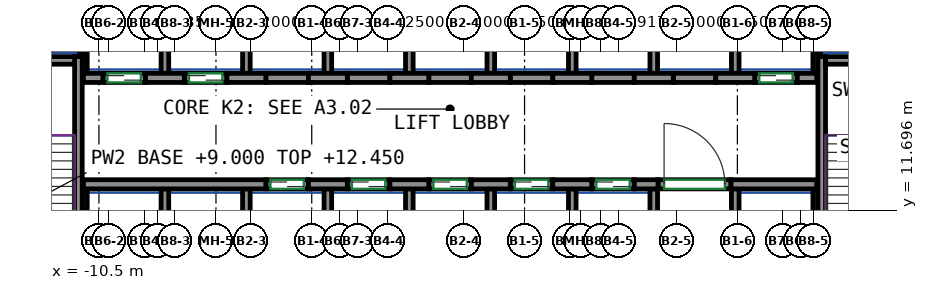
"""IFC4 building model, lengths in metres.
Left out: names, types, materials, properties, quantities, classifications, styles, units other than length and angle.
Written with IfcOpenShell. Run it as: python <this file> out.ifc"""

import sys

from ifc_helpers import new_model, si_unit, direction, frame, frame_2d, origin, place, context, subcontext, project, spatial, rectangle, extrude, source, transform, mapped, element, fill, save


model = new_model("IFC4")
c1 = context("Model", 3, precision=1e-05, world=origin(), true_north=direction((0.0, 1.0)))
c2 = subcontext(c1, "Body", "Model", "MODEL_VIEW")
j1 = project(units=[si_unit("LENGTHUNIT", "METRE"), si_unit("PLANEANGLEUNIT", "RADIAN")], contexts=[c1])
p1 = place(None, origin())
s1 = spatial("IfcSite", under=j1, at=p1, CompositionType="ELEMENT")
p2 = place(p1, origin())
s2 = spatial("IfcBuilding", under=s1, at=p2, CompositionType="ELEMENT")
p3 = place(p2, frame((0.0, 0.0, 9.0)))
s3 = spatial("IfcBuildingStorey", under=s2, at=p3, CompositionType="ELEMENT", Elevation=9.0)
m1 = source(origin(), c2, "Body", "SweptSolid", [
    extrude(rectangle(XDim=7.75, YDim=0.25, at=frame_2d((3.875, 0.0))), origin(), (0.0, 0.0, 1.0), 4.1),
])
p4 = place(p3, frame((-11.175, 9.0, 0.0), z_axis=(0.0, 0.0, 1.0), x_axis=(0.0, 1.0, 0.0)))
e1 = element("IfcWall", 1, at=p4, inside=s3, PredefinedType="SHEAR", context=c2, shape_type="MappedRepresentation", body=[
    mapped(m1, transform((0.0, 0.0, 0.0))),
])
m2 = source(origin(), c2, "Body", "SweptSolid", [
    extrude(rectangle(XDim=3.7, YDim=0.25, at=frame_2d((1.85, 0.0))), origin(), (0.0, 0.0, 1.0), 4.1),
])
p5 = place(p3, frame((-15.0, 16.625, 0.0), z_axis=(0.0, 0.0, 1.0), x_axis=(1.0, 0.0, 0.0)))
e2 = element("IfcWall", 2, at=p5, inside=s3, PredefinedType="SHEAR", context=c2, shape_type="MappedRepresentation", body=[
    mapped(m2, transform((0.0, 0.0, 0.0))),
])
p6 = place(p3, frame((13.275, 9.0, 0.0), z_axis=(0.0, 0.0, 1.0), x_axis=(0.0, 1.0, 0.0)))
e3 = element("IfcWall", 3, at=p6, inside=s3, PredefinedType="SHEAR", context=c2, shape_type="MappedRepresentation", body=[
    mapped(m1, transform((0.0, 0.0, 0.0))),
])
m3 = source(origin(), c2, "Body", "SweptSolid", [
    extrude(rectangle(XDim=3.7, YDim=0.25, at=frame_2d((1.85, 0.0))), origin(), (0.0, 0.0, 1.0), 4.1),
])
p7 = place(p3, frame((13.4, 16.625, 0.0), z_axis=(0.0, 0.0, 1.0), x_axis=(1.0, 0.0, 0.0)))
e4 = element("IfcWall", 4, at=p7, inside=s3, PredefinedType="SHEAR", context=c2, shape_type="MappedRepresentation", body=[
    mapped(m3, transform((0.0, 0.0, 0.0))),
])
m4 = source(origin(), c2, "Body", "SweptSolid", [
    extrude(rectangle(XDim=6.0, YDim=0.3, at=frame_2d((3.0, 0.0))), origin(), (0.0, 0.0, 1.0), 4.1),
])
p8 = place(p3, frame((-11.01, 12.55, 0.0), z_axis=(0.0, 0.0, 1.0), x_axis=(1.0, 0.0, 0.0)))
e5 = element("IfcWall", 5, at=p8, inside=s3, PredefinedType="SHEAR", context=c2, shape_type="MappedRepresentation", body=[
    mapped(m4, transform((0.0, 0.0, 0.0))),
])
m5 = source(origin(), c2, "Body", "SweptSolid", [
    extrude(rectangle(XDim=1.28, YDim=0.3, at=frame_2d((0.64, 0.0))), origin(), (0.0, 0.0, 1.0), 4.1),
])
for number, where, z_axis, x_axis in (
    (6, (-3.61, 12.55, 0.0), (0.0, 0.0, 1.0), (1.0, 0.0, 0.0)),
    (7, (-0.93, 12.55, 0.0), (0.0, 0.0, 1.0), (1.0, 0.0, 0.0)),
    (8, (1.75, 12.55, 0.0), (0.0, 0.0, 1.0), (1.0, 0.0, 0.0)),
    (9, (4.43, 12.55, 0.0), (0.0, 0.0, 1.0), (1.0, 0.0, 0.0)),
):
    element("IfcWall", number, at=place(p3, frame(where, z_axis=z_axis, x_axis=x_axis)), inside=s3, PredefinedType="SHEAR", context=c2, shape_type="MappedRepresentation", body=[
        mapped(m5, transform((0.0, 0.0, 0.0))),
    ])
m6 = source(origin(), c2, "Body", "SweptSolid", [
    extrude(rectangle(XDim=0.78, YDim=0.3, at=frame_2d((0.39, 0.0))), origin(), (0.0, 0.0, 1.0), 4.1),
])
p9 = place(p3, frame((7.11, 12.55, 0.0), z_axis=(0.0, 0.0, 1.0), x_axis=(1.0, 0.0, 0.0)))
e10 = element("IfcWall", 10, at=p9, inside=s3, PredefinedType="SHEAR", context=c2, shape_type="MappedRepresentation", body=[
    mapped(m6, transform((0.0, 0.0, 0.0))),
])
m7 = source(origin(), c2, "Body", "SweptSolid", [
    extrude(rectangle(XDim=2.82, YDim=0.3, at=frame_2d((1.41, 0.0))), origin(), (0.0, 0.0, 1.0), 4.1),
])
p10 = place(p3, frame((10.29, 12.55, 0.0), z_axis=(0.0, 0.0, 1.0), x_axis=(1.0, 0.0, 0.0)))
e11 = element("IfcWall", 11, at=p10, inside=s3, PredefinedType="SHEAR", context=c2, shape_type="MappedRepresentation", body=[
    mapped(m7, transform((0.0, 0.0, 0.0))),
])
m8 = source(origin(), c2, "Body", "SweptSolid", [
    extrude(rectangle(XDim=0.64, YDim=0.3, at=frame_2d((0.32, 0.0))), origin(), (0.0, 0.0, 1.0), 4.1),
])
p11 = place(p3, frame((-11.01, 16.05, 0.0), z_axis=(0.0, 0.0, 1.0), x_axis=(1.0, 0.0, 0.0)))
e12 = element("IfcWall", 12, at=p11, inside=s3, PredefinedType="SHEAR", context=c2, shape_type="MappedRepresentation", body=[
    mapped(m8, transform((0.0, 0.0, 0.0))),
])
for number, where, z_axis, x_axis in (
    (13, (-8.97, 16.05, 0.0), (0.0, 0.0, 1.0), (1.0, 0.0, 0.0)),
    (14, (-6.29, 16.05, 0.0), (0.0, 0.0, 1.0), (1.0, 0.0, 0.0)),
    (15, (-3.61, 16.05, 0.0), (0.0, 0.0, 1.0), (1.0, 0.0, 0.0)),
    (16, (-0.93, 16.05, 0.0), (0.0, 0.0, 1.0), (1.0, 0.0, 0.0)),
    (17, (1.75, 16.05, 0.0), (0.0, 0.0, 1.0), (1.0, 0.0, 0.0)),
    (18, (4.43, 16.05, 0.0), (0.0, 0.0, 1.0), (1.0, 0.0, 0.0)),
):
    element("IfcWall", number, at=place(p3, frame(where, z_axis=z_axis, x_axis=x_axis)), inside=s3, PredefinedType="SHEAR", context=c2, shape_type="MappedRepresentation", body=[
        mapped(m5, transform((0.0, 0.0, 0.0))),
    ])
m9 = source(origin(), c2, "Body", "SweptSolid", [
    extrude(rectangle(XDim=1.28, YDim=0.3, at=frame_2d((0.64, 0.0))), origin(), (0.0, 0.0, 1.0), 4.1),
])
p12 = place(p3, frame((7.11, 16.05, 0.0), z_axis=(0.0, 0.0, 1.0), x_axis=(1.0, 0.0, 0.0)))
e19 = element("IfcWall", 19, at=p12, inside=s3, PredefinedType="SHEAR", context=c2, shape_type="MappedRepresentation", body=[
    mapped(m9, transform((0.0, 0.0, 0.0))),
])
p13 = place(p3, frame((9.79, 16.05, 0.0), z_axis=(0.0, 0.0, 1.0), x_axis=(1.0, 0.0, 0.0)))
e20 = element("IfcWall", 20, at=p13, inside=s3, PredefinedType="SHEAR", context=c2, shape_type="MappedRepresentation", body=[
    mapped(m5, transform((0.0, 0.0, 0.0))),
])
m10 = source(origin(), c2, "Body", "SweptSolid", [
    extrude(rectangle(XDim=0.64, YDim=0.3, at=frame_2d((0.32, 0.0))), origin(), (0.0, 0.0, 1.0), 4.1),
])
p14 = place(p3, frame((12.47, 16.05, 0.0), z_axis=(0.0, 0.0, 1.0), x_axis=(1.0, 0.0, 0.0)))
e21 = element("IfcWall", 21, at=p14, inside=s3, PredefinedType="SHEAR", context=c2, shape_type="MappedRepresentation", body=[
    mapped(m10, transform((0.0, 0.0, 0.0))),
])
m11 = source(origin(), c2, "Body", "SweptSolid", [
    extrude(rectangle(XDim=1.4, YDim=0.3, at=frame_2d((0.7, 0.0))), origin(), (0.0, 0.0, 1.0), 4.1),
])
p15 = place(p3, frame((-5.01, 12.55, 0.0), z_axis=(0.0, 0.0, 1.0), x_axis=(1.0, 0.0, 0.0)))
e22 = element("IfcWall", 22, at=p15, inside=s3, PredefinedType="PARTITIONING", context=c2, shape_type="MappedRepresentation", body=[
    mapped(m11, transform((0.0, 0.0, 0.0))),
])
p16 = place(p15, frame((0.15, 0.0, 0.0)))
e23 = element("IfcOpeningElement", 23, at=p16, cuts=e22, PredefinedType="OPENING", context=c2, shape_type="SweptSolid", body=[
    extrude(rectangle(XDim=1.1, YDim=2.1, at=frame_2d((0.55, 1.05))), frame((0.0, 0.16, 0.0), z_axis=(0.0, -1.0, 0.0), x_axis=(1.0, 0.0, 0.0)), (0.0, 0.0, 1.0), 0.32),
])
m12 = source(origin(), c2, "Body", "SweptSolid", [
    extrude(rectangle(XDim=1.4, YDim=0.3, at=frame_2d((0.7, 0.0))), origin(), (0.0, 0.0, 1.0), 4.1),
])
p17 = place(p3, frame((-2.33, 12.55, 0.0), z_axis=(0.0, 0.0, 1.0), x_axis=(1.0, 0.0, 0.0)))
e24 = element("IfcWall", 24, at=p17, inside=s3, PredefinedType="PARTITIONING", context=c2, shape_type="MappedRepresentation", body=[
    mapped(m12, transform((0.0, 0.0, 0.0))),
])
p18 = place(p17, frame((0.15, 0.0, 0.0)))
e25 = element("IfcOpeningElement", 25, at=p18, cuts=e24, PredefinedType="OPENING", context=c2, shape_type="SweptSolid", body=[
    extrude(rectangle(XDim=1.1, YDim=2.1, at=frame_2d((0.55, 1.05))), frame((0.0, 0.16, 0.0), z_axis=(0.0, -1.0, 0.0), x_axis=(1.0, 0.0, 0.0)), (0.0, 0.0, 1.0), 0.32),
])
p19 = place(p3, frame((0.35, 12.55, 0.0), z_axis=(0.0, 0.0, 1.0), x_axis=(1.0, 0.0, 0.0)))
e26 = element("IfcWall", 26, at=p19, inside=s3, PredefinedType="PARTITIONING", context=c2, shape_type="MappedRepresentation", body=[
    mapped(m11, transform((0.0, 0.0, 0.0))),
])
p20 = place(p19, frame((0.15, 0.0, 0.0)))
e27 = element("IfcOpeningElement", 27, at=p20, cuts=e26, PredefinedType="OPENING", context=c2, shape_type="SweptSolid", body=[
    extrude(rectangle(XDim=1.1, YDim=2.1, at=frame_2d((0.55, 1.05))), frame((0.0, 0.16, 0.0), z_axis=(0.0, -1.0, 0.0), x_axis=(1.0, 0.0, 0.0)), (0.0, 0.0, 1.0), 0.32),
])
p21 = place(p3, frame((3.03, 12.55, 0.0), z_axis=(0.0, 0.0, 1.0), x_axis=(1.0, 0.0, 0.0)))
e28 = element("IfcWall", 28, at=p21, inside=s3, PredefinedType="PARTITIONING", context=c2, shape_type="MappedRepresentation", body=[
    mapped(m11, transform((0.0, 0.0, 0.0))),
])
p22 = place(p21, frame((0.15, 0.0, 0.0)))
e29 = element("IfcOpeningElement", 29, at=p22, cuts=e28, PredefinedType="OPENING", context=c2, shape_type="SweptSolid", body=[
    extrude(rectangle(XDim=1.1, YDim=2.1, at=frame_2d((0.55, 1.05))), frame((0.0, 0.16, 0.0), z_axis=(0.0, -1.0, 0.0), x_axis=(1.0, 0.0, 0.0)), (0.0, 0.0, 1.0), 0.32),
])
p23 = place(p3, frame((5.71, 12.55, 0.0), z_axis=(0.0, 0.0, 1.0), x_axis=(1.0, 0.0, 0.0)))
e30 = element("IfcWall", 30, at=p23, inside=s3, PredefinedType="PARTITIONING", context=c2, shape_type="MappedRepresentation", body=[
    mapped(m12, transform((0.0, 0.0, 0.0))),
])
p24 = place(p23, frame((0.15, 0.0, 0.0)))
e31 = element("IfcOpeningElement", 31, at=p24, cuts=e30, PredefinedType="OPENING", context=c2, shape_type="SweptSolid", body=[
    extrude(rectangle(XDim=1.1, YDim=2.1, at=frame_2d((0.55, 1.05))), frame((0.0, 0.16, 0.0), z_axis=(0.0, -1.0, 0.0), x_axis=(1.0, 0.0, 0.0)), (0.0, 0.0, 1.0), 0.32),
])
p25 = place(p3, frame((11.07, 16.05, 0.0), z_axis=(0.0, 0.0, 1.0), x_axis=(1.0, 0.0, 0.0)))
e32 = element("IfcWall", 32, at=p25, inside=s3, PredefinedType="PARTITIONING", context=c2, shape_type="MappedRepresentation", body=[
    mapped(m11, transform((0.0, 0.0, 0.0))),
])
p26 = place(p25, frame((0.15, 0.0, 0.0)))
e33 = element("IfcOpeningElement", 33, at=p26, cuts=e32, PredefinedType="OPENING", context=c2, shape_type="SweptSolid", body=[
    extrude(rectangle(XDim=1.1, YDim=2.1, at=frame_2d((0.55, 1.05))), frame((0.0, 0.16, 0.0), z_axis=(0.0, -1.0, 0.0), x_axis=(1.0, 0.0, 0.0)), (0.0, 0.0, 1.0), 0.32),
])
p27 = place(p3, frame((-10.37, 16.05, 0.0), z_axis=(0.0, 0.0, 1.0), x_axis=(1.0, 0.0, 0.0)))
e34 = element("IfcWall", 34, at=p27, inside=s3, PredefinedType="PARTITIONING", context=c2, shape_type="MappedRepresentation", body=[
    mapped(m12, transform((0.0, 0.0, 0.0))),
])
p28 = place(p27, frame((0.15, 0.0, 0.0)))
e35 = element("IfcOpeningElement", 35, at=p28, cuts=e34, PredefinedType="OPENING", context=c2, shape_type="SweptSolid", body=[
    extrude(rectangle(XDim=1.1, YDim=2.1, at=frame_2d((0.55, 1.05))), frame((0.0, 0.16, 0.0), z_axis=(0.0, -1.0, 0.0), x_axis=(1.0, 0.0, 0.0)), (0.0, 0.0, 1.0), 0.32),
])
p29 = place(p3, frame((-7.69, 16.05, 0.0), z_axis=(0.0, 0.0, 1.0), x_axis=(1.0, 0.0, 0.0)))
e36 = element("IfcWall", 36, at=p29, inside=s3, PredefinedType="PARTITIONING", context=c2, shape_type="MappedRepresentation", body=[
    mapped(m11, transform((0.0, 0.0, 0.0))),
])
p30 = place(p29, frame((0.15, 0.0, 0.0)))
e37 = element("IfcOpeningElement", 37, at=p30, cuts=e36, PredefinedType="OPENING", context=c2, shape_type="SweptSolid", body=[
    extrude(rectangle(XDim=1.1, YDim=2.1, at=frame_2d((0.55, 1.05))), frame((0.0, 0.16, 0.0), z_axis=(0.0, -1.0, 0.0), x_axis=(1.0, 0.0, 0.0)), (0.0, 0.0, 1.0), 0.32),
])
m13 = source(origin(), c2, "Body", "SweptSolid", [
    extrude(rectangle(XDim=2.4, YDim=0.3, at=frame_2d((1.2, 0.0))), origin(), (0.0, 0.0, 1.0), 4.1),
])
p31 = place(p3, frame((7.89, 12.55, 0.0), z_axis=(0.0, 0.0, 1.0), x_axis=(1.0, 0.0, 0.0)))
e38 = element("IfcWall", 38, at=p31, inside=s3, PredefinedType="PARTITIONING", context=c2, shape_type="MappedRepresentation", body=[
    mapped(m13, transform((0.0, 0.0, 0.0))),
])
p32 = place(p31, frame((0.2, 0.0, 0.0)))
e39 = element("IfcOpeningElement", 39, at=p32, cuts=e38, PredefinedType="OPENING", context=c2, shape_type="SweptSolid", body=[
    extrude(rectangle(XDim=2.0, YDim=2.1, at=frame_2d((1.0, 1.05))), frame((0.0, 0.16, 0.0), z_axis=(0.0, -1.0, 0.0), x_axis=(1.0, 0.0, 0.0)), (0.0, 0.0, 1.0), 0.32),
])
p33 = place(p3, frame((-5.01, 16.05, 0.0), z_axis=(0.0, 0.0, 1.0), x_axis=(1.0, 0.0, 0.0)))
e40 = element("IfcWall", 40, at=p33, inside=s3, PredefinedType="PARTITIONING", context=c2, shape_type="MappedRepresentation", body=[
    mapped(m11, transform((0.0, 0.0, 0.0))),
])
p34 = place(p3, frame((-2.33, 16.05, 0.0), z_axis=(0.0, 0.0, 1.0), x_axis=(1.0, 0.0, 0.0)))
e41 = element("IfcWall", 41, at=p34, inside=s3, PredefinedType="PARTITIONING", context=c2, shape_type="MappedRepresentation", body=[
    mapped(m12, transform((0.0, 0.0, 0.0))),
])
for number, where, z_axis, x_axis in (
    (42, (0.35, 16.05, 0.0), (0.0, 0.0, 1.0), (1.0, 0.0, 0.0)),
    (43, (3.03, 16.05, 0.0), (0.0, 0.0, 1.0), (1.0, 0.0, 0.0)),
):
    element("IfcWall", number, at=place(p3, frame(where, z_axis=z_axis, x_axis=x_axis)), inside=s3, PredefinedType="PARTITIONING", context=c2, shape_type="MappedRepresentation", body=[
        mapped(m11, transform((0.0, 0.0, 0.0))),
    ])
for number, where, z_axis, x_axis in (
    (44, (5.71, 16.05, 0.0), (0.0, 0.0, 1.0), (1.0, 0.0, 0.0)),
    (45, (8.39, 16.05, 0.0), (0.0, 0.0, 1.0), (1.0, 0.0, 0.0)),
):
    element("IfcWall", number, at=place(p3, frame(where, z_axis=z_axis, x_axis=x_axis)), inside=s3, PredefinedType="PARTITIONING", context=c2, shape_type="MappedRepresentation", body=[
        mapped(m12, transform((0.0, 0.0, 0.0))),
    ])
m14 = source(origin(), c2, "Body", "SweptSolid", [
    extrude(rectangle(XDim=3.275, YDim=0.165, at=frame_2d((1.638, 0.0))), origin(), (0.0, 0.0, 1.0), 4.1),
])
for number, where, z_axis, x_axis in (
    (46, (13.067, 16.2, 0.0), (0.0, 0.0, 1.0), (0.0, 1.0, 0.0)),
    (47, (-10.968, 16.2, 0.0), (0.0, 0.0, 1.0), (0.0, 1.0, 0.0)),
):
    element("IfcWall", number, at=place(p3, frame(where, z_axis=z_axis, x_axis=x_axis)), inside=s3, PredefinedType="PARTITIONING", context=c2, shape_type="MappedRepresentation", body=[
        mapped(m14, transform((0.0, 0.0, 0.0))),
    ])
m15 = source(origin(), c2, "Body", "SweptSolid", [
    extrude(rectangle(XDim=3.275, YDim=0.25, at=frame_2d((1.638, 0.0))), origin(), (0.0, 0.0, 1.0), 4.1),
])
p35 = place(p3, frame((10.43, 16.2, 0.0), z_axis=(0.0, 0.0, 1.0), x_axis=(0.0, 1.0, 0.0)))
e48 = element("IfcWall", 48, at=p35, inside=s3, PredefinedType="PARTITIONING", context=c2, shape_type="MappedRepresentation", body=[
    mapped(m15, transform((0.0, 0.0, 0.0))),
])
m16 = source(origin(), c2, "Body", "SweptSolid", [
    extrude(rectangle(XDim=2.725, YDim=0.085, at=frame_2d((1.363, 0.0))), origin(), (0.0, 0.0, 1.0), 4.1),
])
p36 = place(p3, frame((13.192, 16.75, 0.0), z_axis=(0.0, 0.0, 1.0), x_axis=(0.0, 1.0, 0.0)))
e49 = element("IfcWall", 49, at=p36, inside=s3, PredefinedType="PARTITIONING", context=c2, shape_type="MappedRepresentation", body=[
    mapped(m16, transform((0.0, 0.0, 0.0))),
])
for number, where, z_axis, x_axis in (
    (50, (2.39, 16.2, 0.0), (0.0, 0.0, 1.0), (0.0, 1.0, 0.0)),
    (51, (5.07, 16.2, 0.0), (0.0, 0.0, 1.0), (0.0, 1.0, 0.0)),
    (52, (7.75, 16.2, 0.0), (0.0, 0.0, 1.0), (0.0, 1.0, 0.0)),
    (53, (-0.29, 16.2, 0.0), (0.0, 0.0, 1.0), (0.0, 1.0, 0.0)),
):
    element("IfcWall", number, at=place(p3, frame(where, z_axis=z_axis, x_axis=x_axis)), inside=s3, PredefinedType="PARTITIONING", context=c2, shape_type="MappedRepresentation", body=[
        mapped(m15, transform((0.0, 0.0, 0.0))),
    ])
p37 = place(p3, frame((-11.093, 16.75, 0.0), z_axis=(0.0, 0.0, 1.0), x_axis=(0.0, 1.0, 0.0)))
e54 = element("IfcWall", 54, at=p37, inside=s3, PredefinedType="PARTITIONING", context=c2, shape_type="MappedRepresentation", body=[
    mapped(m16, transform((0.0, 0.0, 0.0))),
])
for number, where, z_axis, x_axis in (
    (55, (-2.97, 16.2, 0.0), (0.0, 0.0, 1.0), (0.0, 1.0, 0.0)),
    (56, (-5.65, 16.2, 0.0), (0.0, 0.0, 1.0), (0.0, 1.0, 0.0)),
    (57, (-8.33, 16.2, 0.0), (0.0, 0.0, 1.0), (0.0, 1.0, 0.0)),
):
    element("IfcWall", number, at=place(p3, frame(where, z_axis=z_axis, x_axis=x_axis)), inside=s3, PredefinedType="PARTITIONING", context=c2, shape_type="MappedRepresentation", body=[
        mapped(m15, transform((0.0, 0.0, 0.0))),
    ])
m17 = source(origin(), c2, "Body", "SweptSolid", [
    extrude(rectangle(XDim=3.4, YDim=0.25, at=frame_2d((1.7, 0.0))), origin(), (0.0, 0.0, 1.0), 4.1),
])
p38 = place(p3, frame((10.43, 9.0, 0.0), z_axis=(0.0, 0.0, 1.0), x_axis=(0.0, 1.0, 0.0)))
e58 = element("IfcWall", 58, at=p38, inside=s3, PredefinedType="PARTITIONING", context=c2, shape_type="MappedRepresentation", body=[
    mapped(m17, transform((0.0, 0.0, 0.0))),
])
m18 = source(origin(), c2, "Body", "SweptSolid", [
    extrude(rectangle(XDim=3.4, YDim=0.165, at=frame_2d((1.7, 0.0))), origin(), (0.0, 0.0, 1.0), 4.1),
])
p39 = place(p3, frame((13.067, 9.0, 0.0), z_axis=(0.0, 0.0, 1.0), x_axis=(0.0, 1.0, 0.0)))
e59 = element("IfcWall", 59, at=p39, inside=s3, PredefinedType="PARTITIONING", context=c2, shape_type="MappedRepresentation", body=[
    mapped(m18, transform((0.0, 0.0, 0.0))),
])
for number, where, z_axis, x_axis in (
    (60, (2.39, 9.0, 0.0), (0.0, 0.0, 1.0), (0.0, 1.0, 0.0)),
    (61, (5.07, 9.0, 0.0), (0.0, 0.0, 1.0), (0.0, 1.0, 0.0)),
    (62, (7.75, 9.0, 0.0), (0.0, 0.0, 1.0), (0.0, 1.0, 0.0)),
    (63, (-0.29, 9.0, 0.0), (0.0, 0.0, 1.0), (0.0, 1.0, 0.0)),
):
    element("IfcWall", number, at=place(p3, frame(where, z_axis=z_axis, x_axis=x_axis)), inside=s3, PredefinedType="PARTITIONING", context=c2, shape_type="MappedRepresentation", body=[
        mapped(m17, transform((0.0, 0.0, 0.0))),
    ])
p40 = place(p3, frame((-10.968, 9.0, 0.0), z_axis=(0.0, 0.0, 1.0), x_axis=(0.0, 1.0, 0.0)))
e64 = element("IfcWall", 64, at=p40, inside=s3, PredefinedType="PARTITIONING", context=c2, shape_type="MappedRepresentation", body=[
    mapped(m18, transform((0.0, 0.0, 0.0))),
])
for number, where, z_axis, x_axis in (
    (65, (-2.97, 9.0, 0.0), (0.0, 0.0, 1.0), (0.0, 1.0, 0.0)),
    (66, (-5.65, 9.0, 0.0), (0.0, 0.0, 1.0), (0.0, 1.0, 0.0)),
    (67, (-8.33, 9.0, 0.0), (0.0, 0.0, 1.0), (0.0, 1.0, 0.0)),
):
    element("IfcWall", number, at=place(p3, frame(where, z_axis=z_axis, x_axis=x_axis)), inside=s3, PredefinedType="PARTITIONING", context=c2, shape_type="MappedRepresentation", body=[
        mapped(m17, transform((0.0, 0.0, 0.0))),
    ])
p41 = place(p32, origin())
e68 = element("IfcDoor", 68, at=p41, inside=s3, OperationType="DOUBLE_DOOR_SINGLE_SWING", PredefinedType="DOOR", context=c2, shape_type="SweptSolid", body=[
    extrude(rectangle(XDim=2.0, YDim=2.1, at=frame_2d((1.0, 1.05))), frame((0.0, 0.025, 0.0), z_axis=(0.0, -1.0, 0.0), x_axis=(1.0, 0.0, 0.0)), (0.0, 0.0, 1.0), 0.05),
])
fill(e39, e68)
p42 = place(p16, origin())
e69 = element("IfcDoor", 69, at=p42, inside=s3, OperationType="DOUBLE_DOOR_SLIDING", PredefinedType="DOOR", context=c2, shape_type="SweptSolid", body=[
    extrude(rectangle(XDim=1.1, YDim=2.1, at=frame_2d((0.55, 1.05))), frame((0.0, 0.025, 0.0), z_axis=(0.0, -1.0, 0.0), x_axis=(1.0, 0.0, 0.0)), (0.0, 0.0, 1.0), 0.05),
])
fill(e23, e69)
p43 = place(p18, origin())
e70 = element("IfcDoor", 70, at=p43, inside=s3, OperationType="DOUBLE_DOOR_SLIDING", PredefinedType="DOOR", context=c2, shape_type="SweptSolid", body=[
    extrude(rectangle(XDim=1.1, YDim=2.1, at=frame_2d((0.55, 1.05))), frame((0.0, 0.025, 0.0), z_axis=(0.0, -1.0, 0.0), x_axis=(1.0, 0.0, 0.0)), (0.0, 0.0, 1.0), 0.05),
])
fill(e25, e70)
p44 = place(p20, origin())
e71 = element("IfcDoor", 71, at=p44, inside=s3, OperationType="DOUBLE_DOOR_SLIDING", PredefinedType="DOOR", context=c2, shape_type="SweptSolid", body=[
    extrude(rectangle(XDim=1.1, YDim=2.1, at=frame_2d((0.55, 1.05))), frame((0.0, 0.025, 0.0), z_axis=(0.0, -1.0, 0.0), x_axis=(1.0, 0.0, 0.0)), (0.0, 0.0, 1.0), 0.05),
])
fill(e27, e71)
p45 = place(p22, origin())
e72 = element("IfcDoor", 72, at=p45, inside=s3, OperationType="DOUBLE_DOOR_SLIDING", PredefinedType="DOOR", context=c2, shape_type="SweptSolid", body=[
    extrude(rectangle(XDim=1.1, YDim=2.1, at=frame_2d((0.55, 1.05))), frame((0.0, 0.025, 0.0), z_axis=(0.0, -1.0, 0.0), x_axis=(1.0, 0.0, 0.0)), (0.0, 0.0, 1.0), 0.05),
])
fill(e29, e72)
p46 = place(p24, origin())
e73 = element("IfcDoor", 73, at=p46, inside=s3, OperationType="DOUBLE_DOOR_SLIDING", PredefinedType="DOOR", context=c2, shape_type="SweptSolid", body=[
    extrude(rectangle(XDim=1.1, YDim=2.1, at=frame_2d((0.55, 1.05))), frame((0.0, 0.025, 0.0), z_axis=(0.0, -1.0, 0.0), x_axis=(1.0, 0.0, 0.0)), (0.0, 0.0, 1.0), 0.05),
])
fill(e31, e73)
p47 = place(p26, origin())
e74 = element("IfcDoor", 74, at=p47, inside=s3, OperationType="DOUBLE_DOOR_SLIDING", PredefinedType="DOOR", context=c2, shape_type="SweptSolid", body=[
    extrude(rectangle(XDim=1.1, YDim=2.1, at=frame_2d((0.55, 1.05))), frame((0.0, 0.025, 0.0), z_axis=(0.0, -1.0, 0.0), x_axis=(1.0, 0.0, 0.0)), (0.0, 0.0, 1.0), 0.05),
])
fill(e33, e74)
p48 = place(p28, origin())
e75 = element("IfcDoor", 75, at=p48, inside=s3, OperationType="DOUBLE_DOOR_SLIDING", PredefinedType="DOOR", context=c2, shape_type="SweptSolid", body=[
    extrude(rectangle(XDim=1.1, YDim=2.1, at=frame_2d((0.55, 1.05))), frame((0.0, 0.025, 0.0), z_axis=(0.0, -1.0, 0.0), x_axis=(1.0, 0.0, 0.0)), (0.0, 0.0, 1.0), 0.05),
])
fill(e35, e75)
p49 = place(p30, origin())
e76 = element("IfcDoor", 76, at=p49, inside=s3, OperationType="DOUBLE_DOOR_SLIDING", PredefinedType="DOOR", context=c2, shape_type="SweptSolid", body=[
    extrude(rectangle(XDim=1.1, YDim=2.1, at=frame_2d((0.55, 1.05))), frame((0.0, 0.025, 0.0), z_axis=(0.0, -1.0, 0.0), x_axis=(1.0, 0.0, 0.0)), (0.0, 0.0, 1.0), 0.05),
])
fill(e37, e76)
save(model, sys.argv[1])
